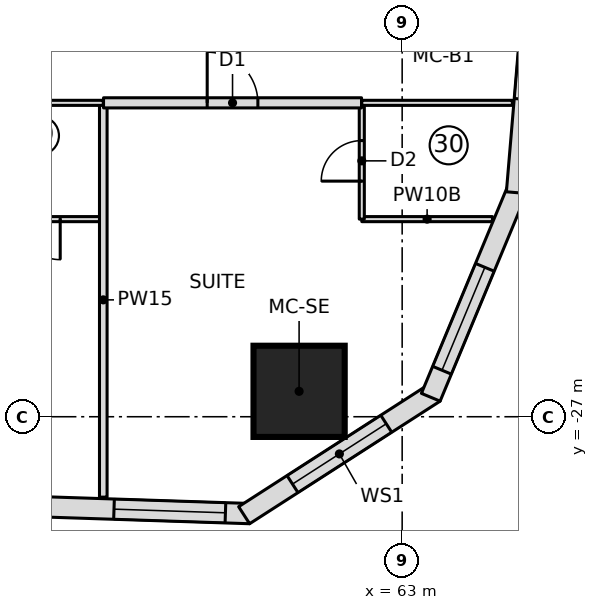
"""IFC4 building model, lengths in metres.
Left out: names, types, materials, properties, quantities, classifications, styles, units other than length and angle.
Written with IfcOpenShell. Run it as: python <this file> out.ifc"""

import sys

from ifc_helpers import new_model, si_unit, direction, frame, frame_2d, origin, origin_2d, place, context, subcontext, project, spatial, polyline, rectangle, outline, extrude, element, fill, save


model = new_model("IFC4")
c1 = context("Model", 3, precision=1e-05, world=origin(), true_north=direction((0.0, 1.0)))
c2 = subcontext(c1, "Body", "Model", "MODEL_VIEW")
j1 = project(units=[si_unit("LENGTHUNIT", "METRE"), si_unit("PLANEANGLEUNIT", "RADIAN")], contexts=[c1])
p1 = place(None, origin())
s1 = spatial("IfcSite", under=j1, at=p1, CompositionType="ELEMENT")
p2 = place(p1, origin())
s2 = spatial("IfcBuilding", under=s1, at=p2, CompositionType="ELEMENT")
p3 = place(p2, frame((0.0, 0.0, 46.7)))
s3 = spatial("IfcBuildingStorey", under=s2, at=p3, CompositionType="ELEMENT", Elevation=46.7)
p4 = place(p3, frame((60.966, -26.499, 0.0), z_axis=(0.0, 0.0, 1.0), x_axis=(1.0, 0.0, 0.0)))
e1 = element("IfcColumn", 1, at=p4, inside=s3, PredefinedType="COLUMN", context=c2, shape_type="SweptSolid", body=[
    extrude(rectangle(XDim=1.8, YDim=1.8, at=origin_2d()), origin(), (0.0, 0.0, 1.0), 3.55),
])
p5 = place(p3, frame((55.59, -28.768, 0.0), z_axis=(0.0, 0.0, 1.0), x_axis=(0.999463576228, -0.032749958686, 0.0)))
e2 = element("IfcWall", 2, at=p5, inside=s3, PredefinedType="NOTDEFINED", context=c2, shape_type="SweptSolid", body=[
    extrude(outline(polyline([(-0.031, -0.2), (4.409, -0.2), (4.284, 0.2), (0.031, 0.2), (-0.031, -0.2)])), origin(), (0.0, 0.0, 1.0), 3.25),
])
p6 = place(p5, frame((1.724, 0.0, 0.6)))
e3 = element("IfcOpeningElement", 3, at=p6, cuts=e2, PredefinedType="OPENING", context=c2, shape_type="SweptSolid", body=[
    extrude(outline(polyline([(0.0, 1.35), (0.084, 1.771), (0.322, 2.128), (0.679, 2.366), (1.1, 2.45), (1.521, 2.366), (1.878, 2.128), (2.116, 1.771), (2.2, 1.35), (2.2, 1.1), (2.116, 0.679), (1.878, 0.322), (1.521, 0.084), (1.1, 0.0), (0.679, 0.084), (0.322, 0.322), (0.084, 0.679), (0.0, 1.1), (0.0, 1.35)])), frame((0.0, 0.21, 0.0), z_axis=(0.0, -1.0, 0.0), x_axis=(1.0, 0.0, 0.0)), (0.0, 0.0, 1.0), 0.42),
])
p7 = place(p3, frame((59.934, -28.91, 0.0), z_axis=(0.0, 0.0, 1.0), x_axis=(0.840937468718, 0.541132307025, 0.0)))
e4 = element("IfcWall", 4, at=p7, inside=s3, PredefinedType="NOTDEFINED", context=c2, shape_type="SweptSolid", body=[
    extrude(outline(polyline([(-0.062, -0.2), (4.409, -0.2), (4.284, 0.2), (0.062, 0.2), (-0.062, -0.2)])), origin(), (0.0, 0.0, 1.0), 3.25),
])
p8 = place(p7, frame((1.073, 0.0, 0.6)))
e5 = element("IfcOpeningElement", 5, at=p8, cuts=e4, PredefinedType="OPENING", context=c2, shape_type="SweptSolid", body=[
    extrude(outline(polyline([(0.0, 1.35), (0.084, 1.771), (0.322, 2.128), (0.679, 2.366), (1.1, 2.45), (1.521, 2.366), (1.878, 2.128), (2.116, 1.771), (2.2, 1.35), (2.2, 1.1), (2.116, 0.679), (1.878, 0.322), (1.521, 0.084), (1.1, 0.0), (0.679, 0.084), (0.322, 0.322), (0.084, 0.679), (0.0, 1.1), (0.0, 1.35)])), frame((0.0, 0.21, 0.0), z_axis=(0.0, -1.0, 0.0), x_axis=(1.0, 0.0, 0.0)), (0.0, 0.0, 1.0), 0.42),
])
p9 = place(p3, frame((63.588, -26.558, 0.0), z_axis=(0.0, 0.0, 1.0), x_axis=(0.384372042685, 0.923178277908, 0.0)))
e6 = element("IfcWall", 6, at=p9, inside=s3, PredefinedType="NOTDEFINED", context=c2, shape_type="SweptSolid", body=[
    extrude(outline(polyline([(-0.062, -0.2), (4.377, -0.2), (4.314, 0.2), (0.062, 0.2), (-0.062, -0.2)])), origin(), (0.0, 0.0, 1.0), 3.25),
])
p10 = place(p9, frame((0.515, 0.0, 0.6)))
e7 = element("IfcOpeningElement", 7, at=p10, cuts=e6, PredefinedType="OPENING", context=c2, shape_type="SweptSolid", body=[
    extrude(outline(polyline([(0.0, 1.35), (0.084, 1.771), (0.322, 2.128), (0.679, 2.366), (1.1, 2.45), (1.521, 2.366), (1.878, 2.128), (2.116, 1.771), (2.2, 1.35), (2.2, 1.1), (2.116, 0.679), (1.878, 0.322), (1.521, 0.084), (1.1, 0.0), (0.679, 0.084), (0.322, 0.322), (0.084, 0.679), (0.0, 1.1), (0.0, 1.35)])), frame((0.0, 0.21, 0.0), z_axis=(0.0, -1.0, 0.0), x_axis=(1.0, 0.0, 0.0)), (0.0, 0.0, 1.0), 0.42),
])
p11 = place(p3, frame((65.259, -22.546, 0.0), z_axis=(0.0, 0.0, 1.0), x_axis=(0.083793550906, 0.996483136248, 0.0)))
e8 = element("IfcWall", 8, at=p11, inside=s3, PredefinedType="NOTDEFINED", context=c2, shape_type="SweptSolid", body=[
    extrude(outline(polyline([(-0.031, -0.2), (4.107, -0.2), (4.104, 0.2), (0.031, 0.2), (-0.031, -0.2)])), origin(), (0.0, 0.0, 1.0), 3.25),
])
p12 = place(p11, frame((1.817, 0.0, 0.5)))
e9 = element("IfcOpeningElement", 9, at=p12, cuts=e8, PredefinedType="OPENING", context=c2, shape_type="SweptSolid", body=[
    extrude(rectangle(XDim=2.0, YDim=2.0, at=frame_2d((1.0, 1.0))), frame((0.0, 0.21, 0.0), z_axis=(0.0, -1.0, 0.0), x_axis=(1.0, 0.0, 0.0)), (0.0, 0.0, 1.0), 0.42),
])
p13 = place(p3, frame((57.102, -23.1, 0.0), z_axis=(0.0, 0.0, 1.0), x_axis=(-1.0, 0.0, 0.0)))
e10 = element("IfcWall", 10, at=p13, inside=s3, PredefinedType="PARTITIONING", context=c2, shape_type="SweptSolid", body=[
    extrude(rectangle(XDim=2.5, YDim=0.1, at=frame_2d((1.25, 0.0))), origin(), (0.0, 0.0, 1.0), 3.25),
])
p14 = place(p13, frame((0.85, 0.0, 0.0)))
e11 = element("IfcOpeningElement", 11, at=p14, cuts=e10, PredefinedType="OPENING", context=c2, shape_type="SweptSolid", body=[
    extrude(rectangle(XDim=0.8, YDim=2.1, at=frame_2d((0.4, 1.05))), frame((0.0, 0.06, 0.0), z_axis=(0.0, -1.0, 0.0), x_axis=(1.0, 0.0, 0.0)), (0.0, 0.0, 1.0), 0.12),
])
p15 = place(p3, frame((64.781, -23.1, 0.0), z_axis=(0.0, 0.0, 1.0), x_axis=(-1.0, 0.0, 0.0)))
e12 = element("IfcWall", 12, at=p15, inside=s3, PredefinedType="PARTITIONING", context=c2, shape_type="SweptSolid", body=[
    extrude(rectangle(XDim=2.578, YDim=0.1, at=frame_2d((1.289, 0.0))), origin(), (0.0, 0.0, 1.0), 3.25),
])
p16 = place(p3, frame((62.203, -23.1, 0.0), z_axis=(0.0, 0.0, 1.0), x_axis=(0.0, 1.0, 0.0)))
e13 = element("IfcWall", 13, at=p16, inside=s3, PredefinedType="PARTITIONING", context=c2, shape_type="SweptSolid", body=[
    extrude(rectangle(XDim=2.3, YDim=0.1, at=frame_2d((1.15, 0.0))), origin(), (0.0, 0.0, 1.0), 3.25),
])
p17 = place(p16, frame((0.75, 0.0, 0.0)))
e14 = element("IfcOpeningElement", 14, at=p17, cuts=e13, PredefinedType="OPENING", context=c2, shape_type="SweptSolid", body=[
    extrude(rectangle(XDim=0.8, YDim=2.1, at=frame_2d((0.4, 1.05))), frame((0.0, 0.06, 0.0), z_axis=(0.0, -1.0, 0.0), x_axis=(1.0, 0.0, 0.0)), (0.0, 0.0, 1.0), 0.12),
])
p18 = place(p3, frame((57.102, -28.587, 0.0), z_axis=(0.0, 0.0, 1.0), x_axis=(0.0, 1.0, 0.0)))
e15 = element("IfcWall", 15, at=p18, inside=s3, PredefinedType="PARTITIONING", context=c2, shape_type="SweptSolid", body=[
    extrude(rectangle(XDim=7.787, YDim=0.15, at=frame_2d((3.894, 0.0))), origin(), (0.0, 0.0, 1.0), 3.25),
])
p19 = place(p3, frame((57.107, -20.805, 0.0), z_axis=(0.0, 0.0, 1.0), x_axis=(1.0, 0.0, 0.0)))
e16 = element("IfcWall", 16, at=p19, inside=s3, PredefinedType="PARTITIONING", context=c2, shape_type="SweptSolid", body=[
    extrude(rectangle(XDim=5.092, YDim=0.2, at=frame_2d((2.546, 0.0))), origin(), (0.0, 0.0, 1.0), 3.25),
])
p20 = place(p19, frame((2.046, 0.0, 0.0)))
e17 = element("IfcOpeningElement", 17, at=p20, cuts=e16, PredefinedType="OPENING", context=c2, shape_type="SweptSolid", body=[
    extrude(rectangle(XDim=1.0, YDim=2.1, at=frame_2d((0.5, 1.05))), frame((0.0, 0.11, 0.0), z_axis=(0.0, -1.0, 0.0), x_axis=(1.0, 0.0, 0.0)), (0.0, 0.0, 1.0), 0.22),
])
p21 = place(p3, frame((54.602, -20.805, 0.0), z_axis=(0.0, 0.0, 1.0), x_axis=(1.0, 0.0, 0.0)))
e18 = element("IfcWall", 18, at=p21, inside=s3, PredefinedType="PARTITIONING", context=c2, shape_type="SweptSolid", body=[
    extrude(rectangle(XDim=2.5, YDim=0.1, at=frame_2d((1.25, 0.0))), origin(), (0.0, 0.0, 1.0), 3.25),
])
p22 = place(p3, frame((62.203, -20.805, 0.0), z_axis=(0.0, 0.0, 1.0), x_axis=(1.0, 0.0, 0.0)))
e19 = element("IfcWall", 19, at=p22, inside=s3, PredefinedType="PARTITIONING", context=c2, shape_type="SweptSolid", body=[
    extrude(rectangle(XDim=2.971, YDim=0.1, at=frame_2d((1.486, 0.0))), origin(), (0.0, 0.0, 1.0), 3.25),
])
p23 = place(p6, origin())
e20 = element("IfcWindow", 20, at=p23, inside=s3, PartitioningType="SINGLE_PANEL", PredefinedType="WINDOW", context=c2, shape_type="SweptSolid", body=[
    extrude(outline(polyline([(0.0, 1.35), (0.084, 1.771), (0.322, 2.128), (0.679, 2.366), (1.1, 2.45), (1.521, 2.366), (1.878, 2.128), (2.116, 1.771), (2.2, 1.35), (2.2, 1.1), (2.116, 0.679), (1.878, 0.322), (1.521, 0.084), (1.1, 0.0), (0.679, 0.084), (0.322, 0.322), (0.084, 0.679), (0.0, 1.1), (0.0, 1.35)])), frame((0.0, 0.17, 0.0), z_axis=(0.0, -1.0, 0.0), x_axis=(1.0, 0.0, 0.0)), (0.0, 0.0, 1.0), 0.06),
])
fill(e3, e20)
p24 = place(p8, origin())
e21 = element("IfcWindow", 21, at=p24, inside=s3, PartitioningType="SINGLE_PANEL", PredefinedType="WINDOW", context=c2, shape_type="SweptSolid", body=[
    extrude(outline(polyline([(0.0, 1.35), (0.084, 1.771), (0.322, 2.128), (0.679, 2.366), (1.1, 2.45), (1.521, 2.366), (1.878, 2.128), (2.116, 1.771), (2.2, 1.35), (2.2, 1.1), (2.116, 0.679), (1.878, 0.322), (1.521, 0.084), (1.1, 0.0), (0.679, 0.084), (0.322, 0.322), (0.084, 0.679), (0.0, 1.1), (0.0, 1.35)])), frame((0.0, 0.17, 0.0), z_axis=(0.0, -1.0, 0.0), x_axis=(1.0, 0.0, 0.0)), (0.0, 0.0, 1.0), 0.06),
])
fill(e5, e21)
p25 = place(p10, origin())
e22 = element("IfcWindow", 22, at=p25, inside=s3, PartitioningType="SINGLE_PANEL", PredefinedType="WINDOW", context=c2, shape_type="SweptSolid", body=[
    extrude(outline(polyline([(0.0, 1.35), (0.084, 1.771), (0.322, 2.128), (0.679, 2.366), (1.1, 2.45), (1.521, 2.366), (1.878, 2.128), (2.116, 1.771), (2.2, 1.35), (2.2, 1.1), (2.116, 0.679), (1.878, 0.322), (1.521, 0.084), (1.1, 0.0), (0.679, 0.084), (0.322, 0.322), (0.084, 0.679), (0.0, 1.1), (0.0, 1.35)])), frame((0.0, 0.17, 0.0), z_axis=(0.0, -1.0, 0.0), x_axis=(1.0, 0.0, 0.0)), (0.0, 0.0, 1.0), 0.06),
])
fill(e7, e22)
p26 = place(p12, origin())
e23 = element("IfcWindow", 23, at=p26, inside=s3, PartitioningType="SINGLE_PANEL", PredefinedType="WINDOW", context=c2, shape_type="SweptSolid", body=[
    extrude(rectangle(XDim=2.0, YDim=2.0, at=frame_2d((1.0, 1.0))), frame((0.0, 0.17, 0.0), z_axis=(0.0, -1.0, 0.0), x_axis=(1.0, 0.0, 0.0)), (0.0, 0.0, 1.0), 0.06),
])
fill(e9, e23)
p27 = place(p14, origin())
e24 = element("IfcDoor", 24, at=p27, inside=s3, OperationType="SINGLE_SWING_LEFT", PredefinedType="DOOR", context=c2, shape_type="SweptSolid", body=[
    extrude(rectangle(XDim=0.8, YDim=2.1, at=frame_2d((0.4, 1.05))), frame((0.0, 0.025, 0.0), z_axis=(0.0, -1.0, 0.0), x_axis=(1.0, 0.0, 0.0)), (0.0, 0.0, 1.0), 0.05),
])
fill(e11, e24)
p28 = place(p17, origin())
e25 = element("IfcDoor", 25, at=p28, inside=s3, OperationType="SINGLE_SWING_LEFT", PredefinedType="DOOR", context=c2, shape_type="SweptSolid", body=[
    extrude(rectangle(XDim=0.8, YDim=2.1, at=frame_2d((0.4, 1.05))), frame((0.0, 0.025, 0.0), z_axis=(0.0, -1.0, 0.0), x_axis=(1.0, 0.0, 0.0)), (0.0, 0.0, 1.0), 0.05),
])
fill(e14, e25)
p29 = place(p20, origin())
e26 = element("IfcDoor", 26, at=p29, inside=s3, OperationType="SINGLE_SWING_LEFT", PredefinedType="DOOR", context=c2, shape_type="SweptSolid", body=[
    extrude(rectangle(XDim=1.0, YDim=2.1, at=frame_2d((0.5, 1.05))), frame((0.0, 0.025, 0.0), z_axis=(0.0, -1.0, 0.0), x_axis=(1.0, 0.0, 0.0)), (0.0, 0.0, 1.0), 0.05),
])
fill(e17, e26)
save(model, sys.argv[1])
